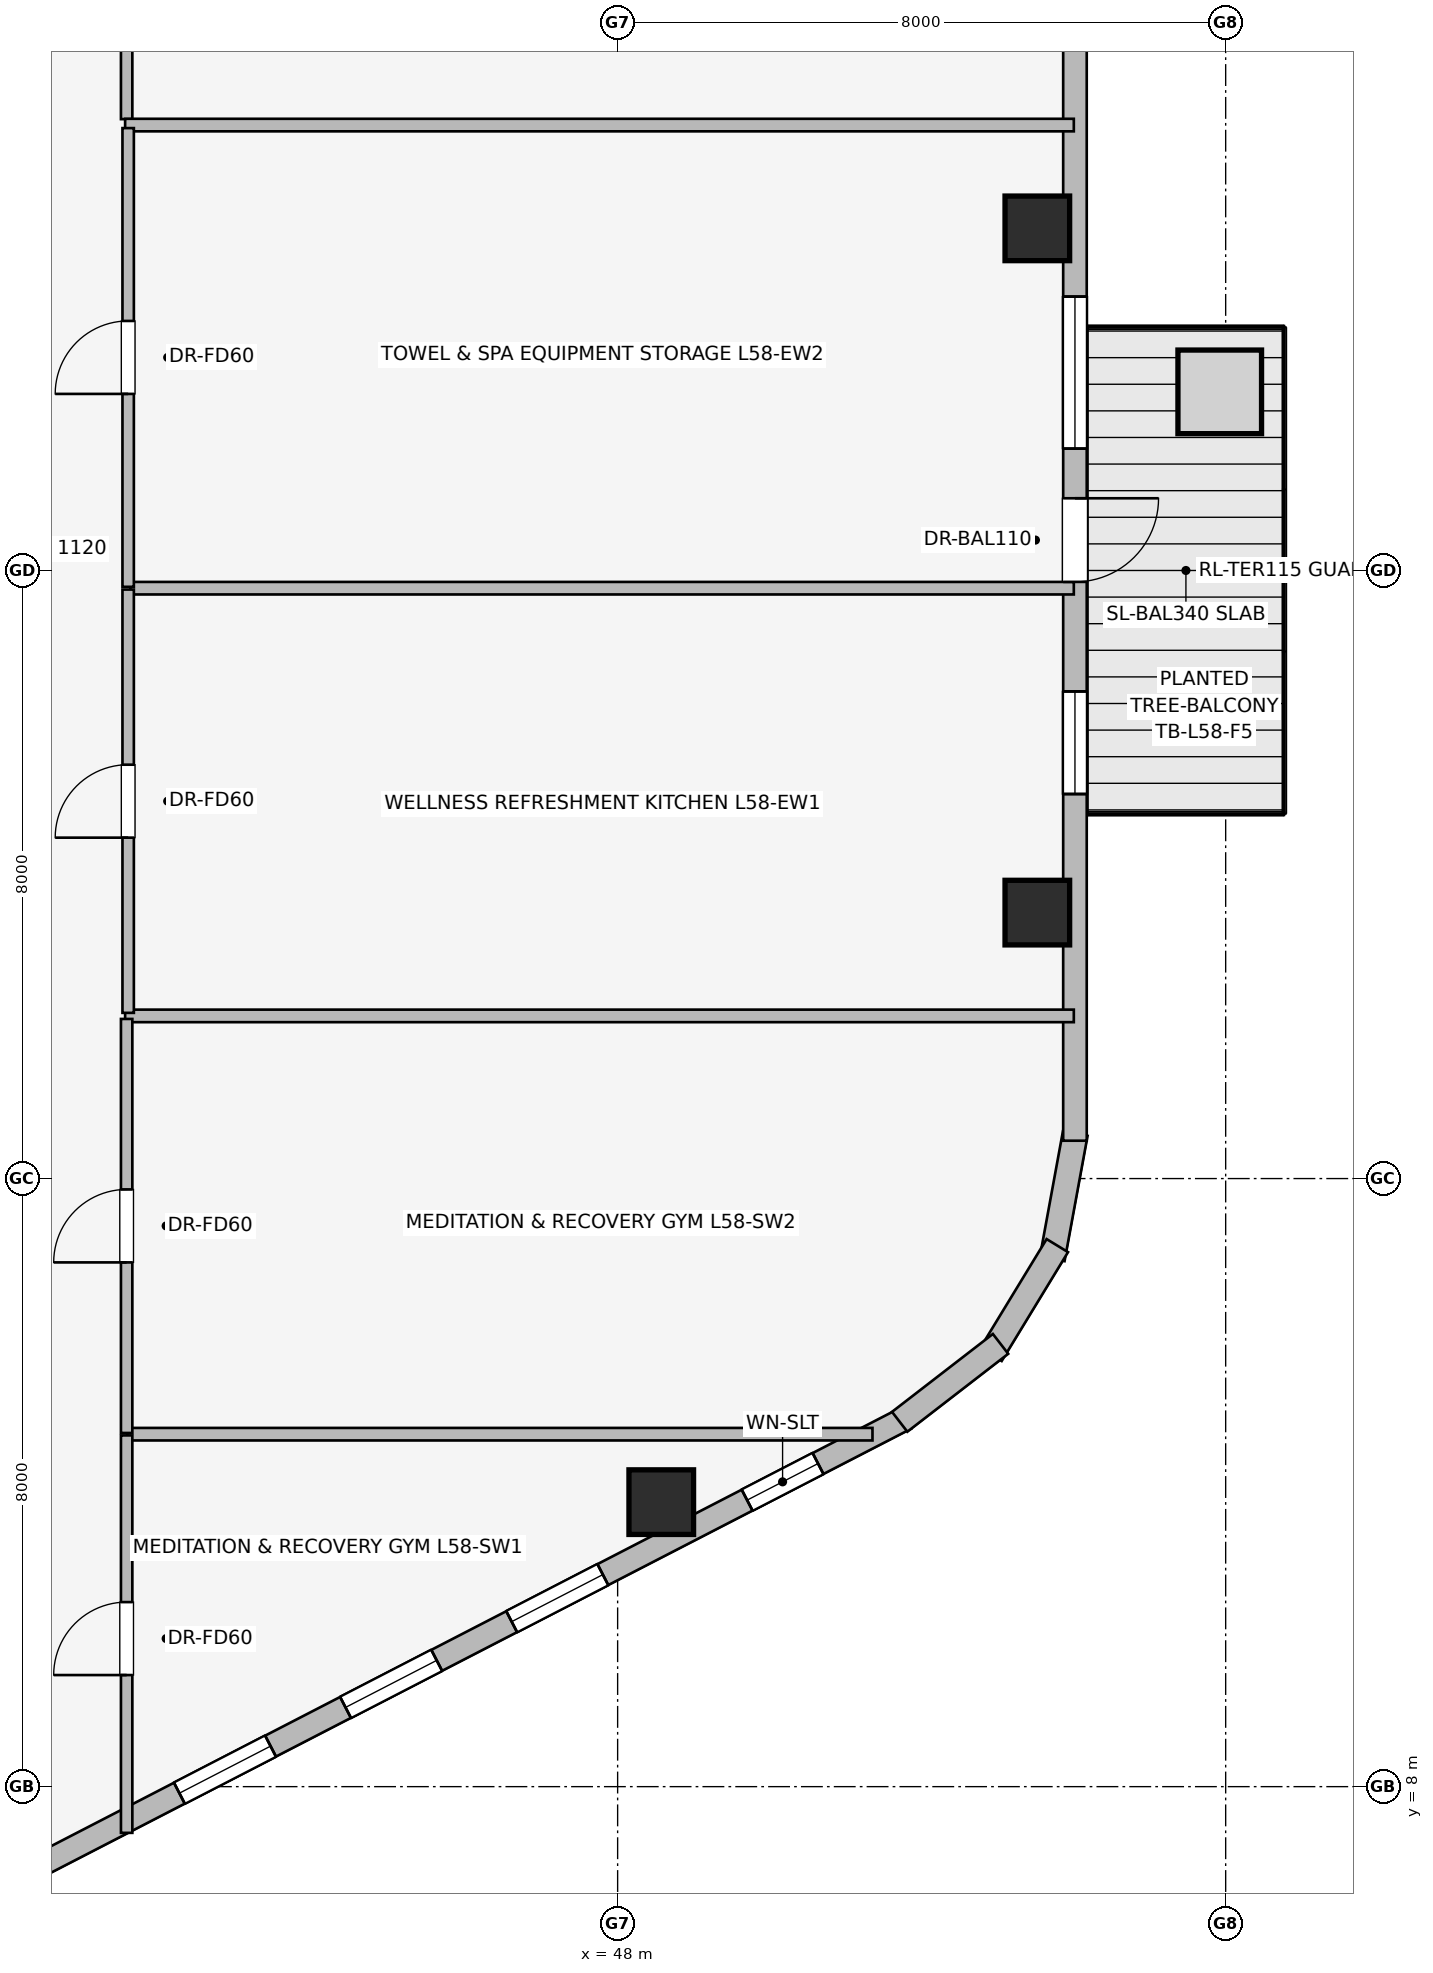
"""IFC4 building model, lengths in metres.
Left out: names, types, materials, properties, quantities, classifications, styles, units other than length and angle.
Written with IfcOpenShell. Run it as: python <this file> out.ifc"""

import sys

from ifc_helpers import new_model, si_unit, direction, frame, frame_2d, origin, origin_2d, place, context, subcontext, project, spatial, rectangle, extrude, element, fill, save


model = new_model("IFC4")
c1 = context("Model", 3, precision=1e-05, world=origin(), true_north=direction((0.0, 1.0)))
c2 = subcontext(c1, "Body", "Model", "MODEL_VIEW")
j1 = project(units=[si_unit("LENGTHUNIT", "METRE"), si_unit("PLANEANGLEUNIT", "RADIAN")], contexts=[c1])
p1 = place(None, origin())
s1 = spatial("IfcSite", under=j1, at=p1, CompositionType="ELEMENT")
p2 = place(p1, origin())
s2 = spatial("IfcBuilding", under=s1, at=p2, CompositionType="ELEMENT")
p3 = place(p2, frame((0.0, 0.0, 213.7)))
s3 = spatial("IfcBuildingStorey", under=s2, at=p3, CompositionType="ELEMENT", Elevation=213.7)
for number, where, z_axis, x_axis in (
    (1, (48.574, 11.743, 0.0), (0.0, 0.0, 1.0), (1.0, 0.0, 0.0)),
    (2, (53.522, 19.499, 0.0), (0.0, 0.0, 1.0), (1.0, 0.0, 0.0)),
    (3, (53.522, 28.501, 0.0), (0.0, 0.0, 1.0), (1.0, 0.0, 0.0)),
):
    element("IfcColumn", number, at=place(p3, frame(where, z_axis=z_axis, x_axis=x_axis)), inside=s3, PredefinedType="COLUMN", context=c2, shape_type="SweptSolid", body=[
        extrude(rectangle(XDim=0.85, YDim=0.85, at=origin_2d()), origin(), (0.0, 0.0, 1.0), 3.45),
    ])
p4 = place(p3, frame((51.792, 12.847, 0.0), z_axis=(0.0, 0.0, 1.0), x_axis=(-0.888626188278, -0.458632202867, 0.0)))
e4 = element("IfcWall", 4, at=p4, inside=s3, PredefinedType="STANDARD", context=c2, shape_type="SweptSolid", body=[
    extrude(rectangle(XDim=16.828, YDim=0.31, at=frame_2d((8.414, 0.0))), origin(), (0.0, 0.0, 1.0), 3.19),
])
p5 = place(p4, frame((1.3, 0.0, 0.75)))
e5 = element("IfcOpeningElement", 5, at=p5, cuts=e4, PredefinedType="OPENING", context=c2, shape_type="SweptSolid", body=[
    extrude(rectangle(XDim=1.05, YDim=1.4, at=frame_2d((0.525, 0.7))), frame((0.0, 0.165, 0.0), z_axis=(0.0, -1.0, 0.0), x_axis=(1.0, 0.0, 0.0)), (0.0, 0.0, 1.0), 0.33),
])
p6 = place(p4, frame((4.486, 0.0, 0.75)))
e6 = element("IfcOpeningElement", 6, at=p6, cuts=e4, PredefinedType="OPENING", context=c2, shape_type="SweptSolid", body=[
    extrude(rectangle(XDim=1.35, YDim=1.45, at=frame_2d((0.675, 0.725))), frame((0.0, 0.165, 0.0), z_axis=(0.0, -1.0, 0.0), x_axis=(1.0, 0.0, 0.0)), (0.0, 0.0, 1.0), 0.33),
])
p7 = place(p4, frame((6.946, 0.0, 0.75)))
e7 = element("IfcOpeningElement", 7, at=p7, cuts=e4, PredefinedType="OPENING", context=c2, shape_type="SweptSolid", body=[
    extrude(rectangle(XDim=1.35, YDim=1.45, at=frame_2d((0.675, 0.725))), frame((0.0, 0.165, 0.0), z_axis=(0.0, -1.0, 0.0), x_axis=(1.0, 0.0, 0.0)), (0.0, 0.0, 1.0), 0.33),
])
p8 = place(p4, frame((9.406, 0.0, 0.75)))
e8 = element("IfcOpeningElement", 8, at=p8, cuts=e4, PredefinedType="OPENING", context=c2, shape_type="SweptSolid", body=[
    extrude(rectangle(XDim=1.35, YDim=1.45, at=frame_2d((0.675, 0.725))), frame((0.0, 0.165, 0.0), z_axis=(0.0, -1.0, 0.0), x_axis=(1.0, 0.0, 0.0)), (0.0, 0.0, 1.0), 0.33),
])
p9 = place(p4, frame((14.153, 0.0, 0.75)))
e9 = element("IfcOpeningElement", 9, at=p9, cuts=e4, PredefinedType="OPENING", context=c2, shape_type="SweptSolid", body=[
    extrude(rectangle(XDim=2.0, YDim=1.5, at=frame_2d((1.0, 0.75))), frame((0.0, 0.165, 0.0), z_axis=(0.0, -1.0, 0.0), x_axis=(1.0, 0.0, 0.0)), (0.0, 0.0, 1.0), 0.33),
])
p10 = place(p3, frame((54.021, 16.592, 0.0), z_axis=(0.0, 0.0, 1.0), x_axis=(-0.180717642671, -0.983535019014, 0.0)))
e10 = element("IfcWall", 10, at=p10, inside=s3, PredefinedType="STANDARD", context=c2, shape_type="SweptSolid", body=[
    extrude(rectangle(XDim=1.677, YDim=0.33, at=frame_2d((0.838, 0.0))), origin(), (0.0, 0.0, 1.0), 3.19),
])
p11 = place(p3, frame((53.785, 15.118, 0.0), z_axis=(0.0, 0.0, 1.0), x_axis=(-0.520219286058, -0.85403272444, 0.0)))
e11 = element("IfcWall", 11, at=p11, inside=s3, PredefinedType="STANDARD", context=c2, shape_type="SweptSolid", body=[
    extrude(rectangle(XDim=1.678, YDim=0.33, at=frame_2d((0.839, 0.0))), origin(), (0.0, 0.0, 1.0), 3.19),
])
p12 = place(p3, frame((53.038, 13.825, 0.0), z_axis=(0.0, 0.0, 1.0), x_axis=(-0.791464279355, -0.611215423976, 0.0)))
e12 = element("IfcWall", 12, at=p12, inside=s3, PredefinedType="STANDARD", context=c2, shape_type="SweptSolid", body=[
    extrude(rectangle(XDim=1.677, YDim=0.33, at=frame_2d((0.838, 0.0))), origin(), (0.0, 0.0, 1.0), 3.19),
])
p13 = place(p3, frame((54.017, 31.502, 0.0), z_axis=(0.0, 0.0, 1.0), x_axis=(0.0, -1.0, 0.0)))
e13 = element("IfcWall", 13, at=p13, inside=s3, PredefinedType="STANDARD", context=c2, shape_type="SweptSolid", body=[
    extrude(rectangle(XDim=15.004, YDim=0.31, at=frame_2d((7.502, 0.0))), origin(), (0.0, 0.0, 1.0), 3.19),
])
p14 = place(p13, frame((6.552, 0.0, 0.0)))
e14 = element("IfcOpeningElement", 14, at=p14, cuts=e13, PredefinedType="OPENING", context=c2, shape_type="SweptSolid", body=[
    extrude(rectangle(XDim=1.1, YDim=2.04, at=frame_2d((0.55, 1.02))), frame((0.0, 0.165, 0.0), z_axis=(0.0, -1.0, 0.0), x_axis=(1.0, 0.0, 0.0)), (0.0, 0.0, 1.0), 0.33),
])
p15 = place(p13, frame((3.899, 0.0, 0.75)))
e15 = element("IfcOpeningElement", 15, at=p15, cuts=e13, PredefinedType="OPENING", context=c2, shape_type="SweptSolid", body=[
    extrude(rectangle(XDim=2.0, YDim=1.5, at=frame_2d((1.0, 0.75))), frame((0.0, 0.165, 0.0), z_axis=(0.0, -1.0, 0.0), x_axis=(1.0, 0.0, 0.0)), (0.0, 0.0, 1.0), 0.33),
])
p16 = place(p13, frame((9.093, 0.0, 0.75)))
e16 = element("IfcOpeningElement", 16, at=p16, cuts=e13, PredefinedType="OPENING", context=c2, shape_type="SweptSolid", body=[
    extrude(rectangle(XDim=1.35, YDim=1.45, at=frame_2d((0.675, 0.725))), frame((0.0, 0.165, 0.0), z_axis=(0.0, -1.0, 0.0), x_axis=(1.0, 0.0, 0.0)), (0.0, 0.0, 1.0), 0.33),
])
p17 = place(p3, frame((41.54, 34.938, 0.0), z_axis=(0.0, 0.0, 1.0), x_axis=(0.0, -1.0, 0.0)))
e17 = element("IfcWall", 17, at=p17, inside=s3, PredefinedType="PARTITIONING", context=c2, shape_type="SweptSolid", body=[
    extrude(rectangle(XDim=5.0, YDim=0.15, at=frame_2d((2.5, 0.0))), origin(), (0.0, 0.0, 1.0), 3.19),
])
p18 = place(p17, frame((1.795, 0.0, 0.0)))
e18 = element("IfcOpeningElement", 18, at=p18, cuts=e17, PredefinedType="OPENING", context=c2, shape_type="SweptSolid", body=[
    extrude(rectangle(XDim=0.96, YDim=2.0, at=frame_2d((0.48, 1.0))), frame((0.0, 0.085, 0.0), z_axis=(0.0, -1.0, 0.0), x_axis=(1.0, 0.0, 0.0)), (0.0, 0.0, 1.0), 0.17),
])
for number, where, z_axis, x_axis in (
    (19, (41.52, 18.14, 0.0), (0.0, 0.0, 1.0), (1.0, 0.0, 0.0)),
    (20, (41.52, 29.86, 0.0), (0.0, 0.0, 1.0), (1.0, 0.0, 0.0)),
):
    element("IfcWall", number, at=place(p3, frame(where, z_axis=z_axis, x_axis=x_axis)), inside=s3, PredefinedType="PARTITIONING", context=c2, shape_type="SweptSolid", body=[
        extrude(rectangle(XDim=12.482, YDim=0.165, at=frame_2d((6.241, 0.0))), origin(), (0.0, 0.0, 1.0), 3.19),
    ])
p19 = place(p3, frame((41.59, 23.767, 0.0), z_axis=(0.0, 0.0, 1.0), x_axis=(1.0, 0.0, 0.0)))
e21 = element("IfcWall", 21, at=p19, inside=s3, PredefinedType="PARTITIONING", context=c2, shape_type="SweptSolid", body=[
    extrude(rectangle(XDim=12.412, YDim=0.165, at=frame_2d((6.206, 0.0))), origin(), (0.0, 0.0, 1.0), 3.19),
])
p20 = place(p3, frame((41.56, 18.18, 0.0), z_axis=(0.0, 0.0, 1.0), x_axis=(0.0, 1.0, 0.0)))
e22 = element("IfcWall", 22, at=p20, inside=s3, PredefinedType="PARTITIONING", context=c2, shape_type="SweptSolid", body=[
    extrude(rectangle(XDim=5.569, YDim=0.15, at=frame_2d((2.785, 0.0))), origin(), (0.0, 0.0, 1.0), 3.19),
])
p21 = place(p20, frame((2.305, 0.0, 0.0)))
e23 = element("IfcOpeningElement", 23, at=p21, cuts=e22, PredefinedType="OPENING", context=c2, shape_type="SweptSolid", body=[
    extrude(rectangle(XDim=0.96, YDim=2.0, at=frame_2d((0.48, 1.0))), frame((0.0, 0.085, 0.0), z_axis=(0.0, -1.0, 0.0), x_axis=(1.0, 0.0, 0.0)), (0.0, 0.0, 1.0), 0.17),
])
p22 = place(p3, frame((41.56, 23.785, 0.0), z_axis=(0.0, 0.0, 1.0), x_axis=(0.0, 1.0, 0.0)))
e24 = element("IfcWall", 24, at=p22, inside=s3, PredefinedType="PARTITIONING", context=c2, shape_type="SweptSolid", body=[
    extrude(rectangle(XDim=6.035, YDim=0.15, at=frame_2d((3.018, 0.0))), origin(), (0.0, 0.0, 1.0), 3.19),
])
p23 = place(p22, frame((2.538, 0.0, 0.0)))
e25 = element("IfcOpeningElement", 25, at=p23, cuts=e24, PredefinedType="OPENING", context=c2, shape_type="SweptSolid", body=[
    extrude(rectangle(XDim=0.96, YDim=2.0, at=frame_2d((0.48, 1.0))), frame((0.0, 0.085, 0.0), z_axis=(0.0, -1.0, 0.0), x_axis=(1.0, 0.0, 0.0)), (0.0, 0.0, 1.0), 0.17),
])
p24 = place(p3, frame((41.55, 12.637, 0.0), z_axis=(0.0, 0.0, 1.0), x_axis=(1.0, 0.0, 0.0)))
e26 = element("IfcWall", 26, at=p24, inside=s3, PredefinedType="PARTITIONING", context=c2, shape_type="SweptSolid", body=[
    extrude(rectangle(XDim=9.803, YDim=0.165, at=frame_2d((4.901, 0.0))), origin(), (0.0, 0.0, 1.0), 3.19),
])
p25 = place(p3, frame((41.54, 7.392, 0.0), z_axis=(0.0, 0.0, 1.0), x_axis=(0.0, 1.0, 0.0)))
e27 = element("IfcWall", 27, at=p25, inside=s3, PredefinedType="PARTITIONING", context=c2, shape_type="SweptSolid", body=[
    extrude(rectangle(XDim=5.229, YDim=0.15, at=frame_2d((2.615, 0.0))), origin(), (0.0, 0.0, 1.0), 3.19),
])
p26 = place(p25, frame((2.076, 0.0, 0.0)))
e28 = element("IfcOpeningElement", 28, at=p26, cuts=e27, PredefinedType="OPENING", context=c2, shape_type="SweptSolid", body=[
    extrude(rectangle(XDim=0.96, YDim=2.0, at=frame_2d((0.48, 1.0))), frame((0.0, 0.085, 0.0), z_axis=(0.0, -1.0, 0.0), x_axis=(1.0, 0.0, 0.0)), (0.0, 0.0, 1.0), 0.17),
])
p27 = place(p3, frame((41.54, 12.653, 0.0), z_axis=(0.0, 0.0, 1.0), x_axis=(0.0, 1.0, 0.0)))
e29 = element("IfcWall", 29, at=p27, inside=s3, PredefinedType="PARTITIONING", context=c2, shape_type="SweptSolid", body=[
    extrude(rectangle(XDim=5.447, YDim=0.15, at=frame_2d((2.724, 0.0))), origin(), (0.0, 0.0, 1.0), 3.19),
])
p28 = place(p27, frame((2.244, 0.0, 0.0)))
e30 = element("IfcOpeningElement", 30, at=p28, cuts=e29, PredefinedType="OPENING", context=c2, shape_type="SweptSolid", body=[
    extrude(rectangle(XDim=0.96, YDim=2.0, at=frame_2d((0.48, 1.0))), frame((0.0, 0.085, 0.0), z_axis=(0.0, -1.0, 0.0), x_axis=(1.0, 0.0, 0.0)), (0.0, 0.0, 1.0), 0.17),
])
p29 = place(p5, origin())
e31 = element("IfcWindow", 31, at=p29, inside=s3, PartitioningType="SINGLE_PANEL", PredefinedType="WINDOW", context=c2, shape_type="SweptSolid", body=[
    extrude(rectangle(XDim=1.05, YDim=1.4, at=frame_2d((0.525, 0.7))), frame((0.0, 0.03, 0.0), z_axis=(0.0, -1.0, 0.0), x_axis=(1.0, 0.0, 0.0)), (0.0, 0.0, 1.0), 0.06),
])
fill(e5, e31)
p30 = place(p6, origin())
e32 = element("IfcWindow", 32, at=p30, inside=s3, PartitioningType="SINGLE_PANEL", PredefinedType="WINDOW", context=c2, shape_type="SweptSolid", body=[
    extrude(rectangle(XDim=1.35, YDim=1.45, at=frame_2d((0.675, 0.725))), frame((0.0, 0.03, 0.0), z_axis=(0.0, -1.0, 0.0), x_axis=(1.0, 0.0, 0.0)), (0.0, 0.0, 1.0), 0.06),
])
fill(e6, e32)
p31 = place(p7, origin())
e33 = element("IfcWindow", 33, at=p31, inside=s3, PartitioningType="SINGLE_PANEL", PredefinedType="WINDOW", context=c2, shape_type="SweptSolid", body=[
    extrude(rectangle(XDim=1.35, YDim=1.45, at=frame_2d((0.675, 0.725))), frame((0.0, 0.03, 0.0), z_axis=(0.0, -1.0, 0.0), x_axis=(1.0, 0.0, 0.0)), (0.0, 0.0, 1.0), 0.06),
])
fill(e7, e33)
p32 = place(p8, origin())
e34 = element("IfcWindow", 34, at=p32, inside=s3, PartitioningType="SINGLE_PANEL", PredefinedType="WINDOW", context=c2, shape_type="SweptSolid", body=[
    extrude(rectangle(XDim=1.35, YDim=1.45, at=frame_2d((0.675, 0.725))), frame((0.0, 0.03, 0.0), z_axis=(0.0, -1.0, 0.0), x_axis=(1.0, 0.0, 0.0)), (0.0, 0.0, 1.0), 0.06),
])
fill(e8, e34)
p33 = place(p14, origin())
e35 = element("IfcDoor", 35, at=p33, inside=s3, OperationType="SINGLE_SWING_LEFT", PredefinedType="DOOR", context=c2, shape_type="SweptSolid", body=[
    extrude(rectangle(XDim=1.1, YDim=2.04, at=frame_2d((0.55, 1.02))), frame((0.0, 0.025, 0.0), z_axis=(0.0, -1.0, 0.0), x_axis=(1.0, 0.0, 0.0)), (0.0, 0.0, 1.0), 0.05),
])
fill(e14, e35)
p34 = place(p15, origin())
e36 = element("IfcWindow", 36, at=p34, inside=s3, PartitioningType="SINGLE_PANEL", PredefinedType="WINDOW", context=c2, shape_type="SweptSolid", body=[
    extrude(rectangle(XDim=2.0, YDim=1.5, at=frame_2d((1.0, 0.75))), frame((0.0, 0.03, 0.0), z_axis=(0.0, -1.0, 0.0), x_axis=(1.0, 0.0, 0.0)), (0.0, 0.0, 1.0), 0.06),
])
fill(e15, e36)
p35 = place(p16, origin())
e37 = element("IfcWindow", 37, at=p35, inside=s3, PartitioningType="SINGLE_PANEL", PredefinedType="WINDOW", context=c2, shape_type="SweptSolid", body=[
    extrude(rectangle(XDim=1.35, YDim=1.45, at=frame_2d((0.675, 0.725))), frame((0.0, 0.03, 0.0), z_axis=(0.0, -1.0, 0.0), x_axis=(1.0, 0.0, 0.0)), (0.0, 0.0, 1.0), 0.06),
])
fill(e16, e37)
p36 = place(p21, origin())
e38 = element("IfcDoor", 38, at=p36, inside=s3, OperationType="SINGLE_SWING_LEFT", PredefinedType="DOOR", context=c2, shape_type="SweptSolid", body=[
    extrude(rectangle(XDim=0.96, YDim=2.0, at=frame_2d((0.48, 1.0))), frame((0.0, 0.025, 0.0), z_axis=(0.0, -1.0, 0.0), x_axis=(1.0, 0.0, 0.0)), (0.0, 0.0, 1.0), 0.05),
])
fill(e23, e38)
p37 = place(p23, origin())
e39 = element("IfcDoor", 39, at=p37, inside=s3, OperationType="SINGLE_SWING_LEFT", PredefinedType="DOOR", context=c2, shape_type="SweptSolid", body=[
    extrude(rectangle(XDim=0.96, YDim=2.0, at=frame_2d((0.48, 1.0))), frame((0.0, 0.025, 0.0), z_axis=(0.0, -1.0, 0.0), x_axis=(1.0, 0.0, 0.0)), (0.0, 0.0, 1.0), 0.05),
])
fill(e25, e39)
p38 = place(p26, origin())
e40 = element("IfcDoor", 40, at=p38, inside=s3, OperationType="SINGLE_SWING_LEFT", PredefinedType="DOOR", context=c2, shape_type="SweptSolid", body=[
    extrude(rectangle(XDim=0.96, YDim=2.0, at=frame_2d((0.48, 1.0))), frame((0.0, 0.025, 0.0), z_axis=(0.0, -1.0, 0.0), x_axis=(1.0, 0.0, 0.0)), (0.0, 0.0, 1.0), 0.05),
])
fill(e28, e40)
p39 = place(p28, origin())
e41 = element("IfcDoor", 41, at=p39, inside=s3, OperationType="SINGLE_SWING_LEFT", PredefinedType="DOOR", context=c2, shape_type="SweptSolid", body=[
    extrude(rectangle(XDim=0.96, YDim=2.0, at=frame_2d((0.48, 1.0))), frame((0.0, 0.025, 0.0), z_axis=(0.0, -1.0, 0.0), x_axis=(1.0, 0.0, 0.0)), (0.0, 0.0, 1.0), 0.05),
])
fill(e30, e41)
save(model, sys.argv[1])
